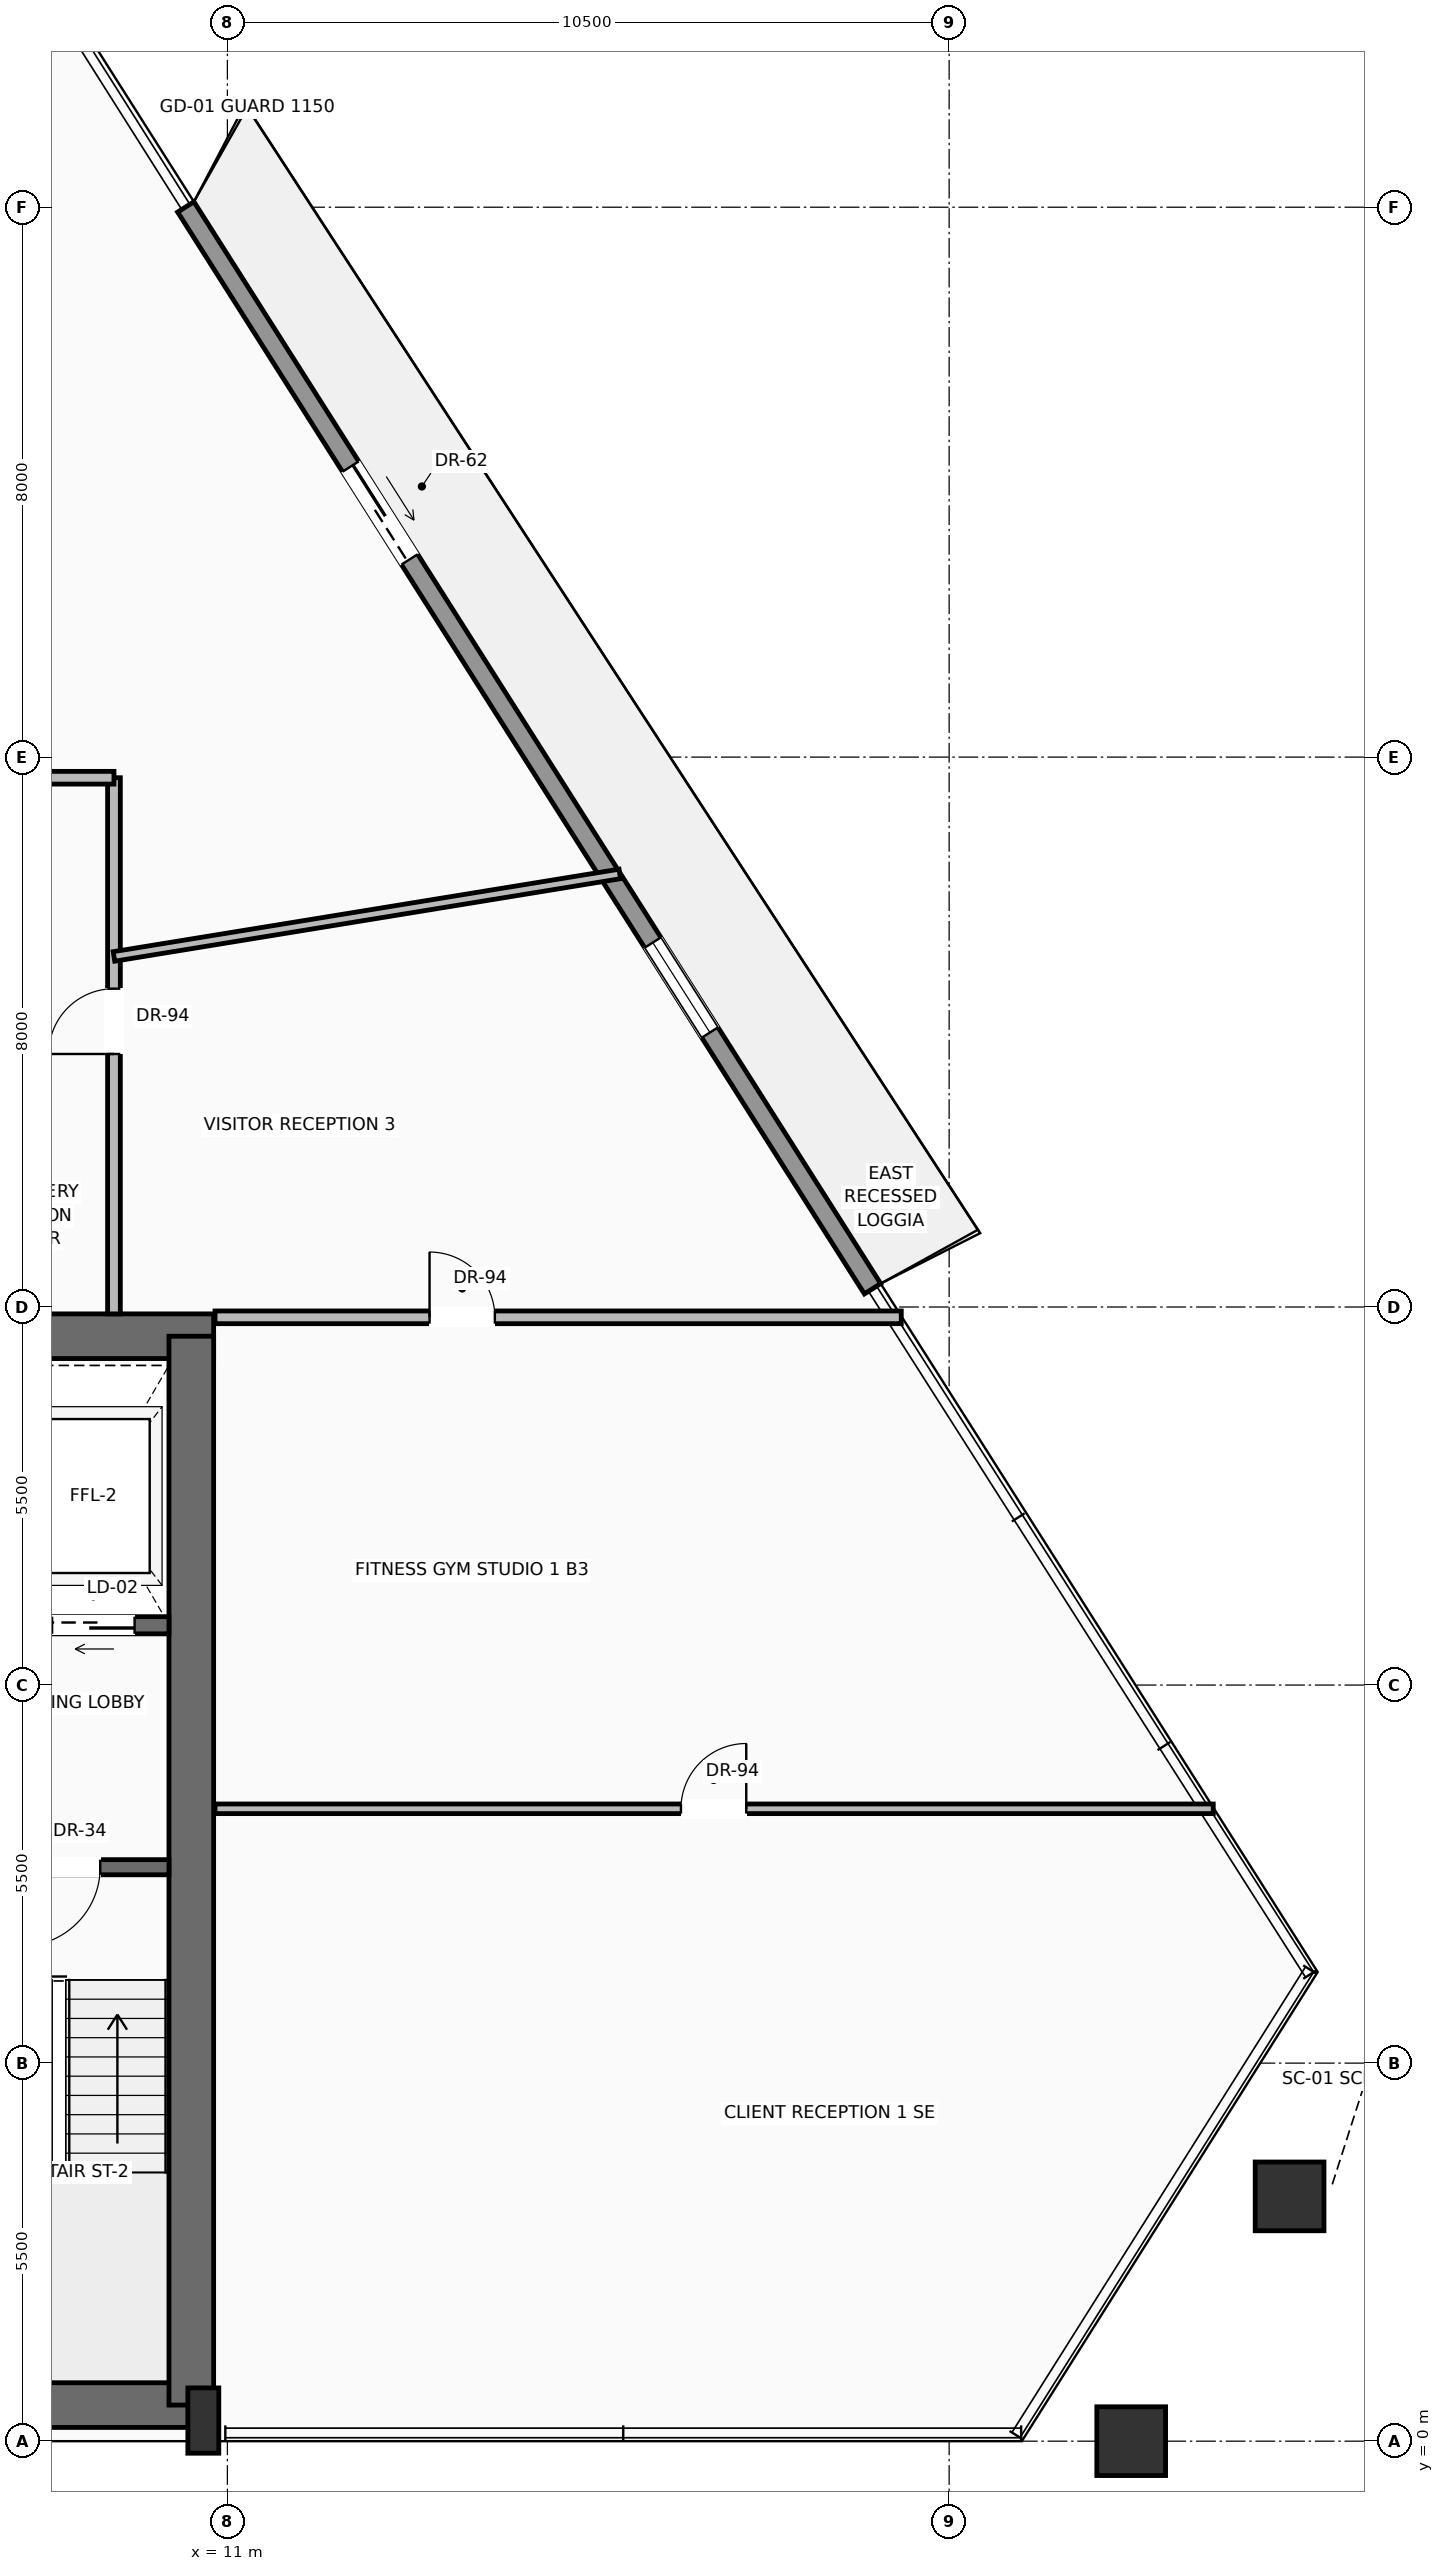
"""IFC4 building model, lengths in metres.
Left out: names, types, materials, properties, quantities, classifications, styles, units other than length and angle.
Written with IfcOpenShell. Run it as: python <this file> out.ifc"""

import sys

from ifc_helpers import new_model, si_unit, direction, frame, frame_2d, origin, origin_2d, place, context, subcontext, project, spatial, rectangle, hollow_rectangle, extrude, source, transform, mapped, element, fill, save


model = new_model("IFC4")
c1 = context("Model", 3, precision=1e-05, world=origin(), true_north=direction((0.0, 1.0)))
c2 = subcontext(c1, "Body", "Model", "MODEL_VIEW")
j1 = project(units=[si_unit("LENGTHUNIT", "METRE"), si_unit("PLANEANGLEUNIT", "RADIAN")], contexts=[c1])
p1 = place(None, origin())
s1 = spatial("IfcSite", under=j1, at=p1, CompositionType="ELEMENT")
p2 = place(p1, origin())
s2 = spatial("IfcBuilding", under=s1, at=p2, CompositionType="ELEMENT")
p3 = place(p2, frame((0.0, 0.0, 171.0)))
s3 = spatial("IfcBuildingStorey", under=s2, at=p3, CompositionType="ELEMENT", Elevation=171.0)
p4 = place(p3, frame((-10.65, 0.525, 0.0), z_axis=(0.0, 0.0, 1.0), x_axis=(1.0, 0.0, 0.0)))
e1 = element("IfcWall", 1, at=p4, inside=s3, PredefinedType="SHEAR", context=c2, shape_type="SweptSolid", body=[
    extrude(rectangle(XDim=21.3, YDim=0.65, at=frame_2d((10.65, 0.0))), origin(), (0.0, 0.0, 1.0), 3.47),
])
p5 = place(p3, frame((-10.8, 16.075, 0.0), z_axis=(0.0, 0.0, 1.0), x_axis=(1.0, 0.0, 0.0)))
e2 = element("IfcWall", 2, at=p5, inside=s3, PredefinedType="SHEAR", context=c2, shape_type="SweptSolid", body=[
    extrude(rectangle(XDim=21.6, YDim=0.65, at=frame_2d((10.8, 0.0))), origin(), (0.0, 0.0, 1.0), 3.47),
])
p6 = place(p5, frame((3.37, 0.0, 0.0)))
e3 = element("IfcOpeningElement", 3, at=p6, cuts=e2, PredefinedType="OPENING", context=c2, shape_type="SweptSolid", body=[
    extrude(rectangle(XDim=1.3, YDim=2.3, at=frame_2d((0.65, 1.15))), frame((0.0, 0.335, 0.0), z_axis=(0.0, -1.0, 0.0), x_axis=(1.0, 0.0, 0.0)), (0.0, 0.0, 1.0), 0.67),
])
p7 = place(p5, frame((9.8, 0.0, 0.0)))
e4 = element("IfcOpeningElement", 4, at=p7, cuts=e2, PredefinedType="OPENING", context=c2, shape_type="SweptSolid", body=[
    extrude(rectangle(XDim=2.0, YDim=2.4, at=frame_2d((1.0, 1.2))), frame((0.0, 0.335, 0.0), z_axis=(0.0, -1.0, 0.0), x_axis=(1.0, 0.0, 0.0)), (0.0, 0.0, 1.0), 0.67),
])
p8 = place(p3, frame((10.475, 0.525, 0.0), z_axis=(0.0, 0.0, 1.0), x_axis=(0.0, 1.0, 0.0)))
e5 = element("IfcWall", 5, at=p8, inside=s3, PredefinedType="SHEAR", context=c2, shape_type="SweptSolid", body=[
    extrude(rectangle(XDim=15.55, YDim=0.65, at=frame_2d((7.775, 0.0))), origin(), (0.0, 0.0, 1.0), 3.47),
])
m1 = source(origin(), c2, "Body", "SweptSolid", [
    extrude(rectangle(XDim=0.45, YDim=0.95, at=origin_2d()), origin(), (0.0, 0.0, 1.0), 3.7),
])
p9 = place(p3, frame((10.65, 0.3, 0.0), z_axis=(0.0, 0.0, 1.0), x_axis=(1.0, 0.0, 0.0)))
e6 = element("IfcColumn", 6, at=p9, inside=s3, PredefinedType="PILASTER", context=c2, shape_type="MappedRepresentation", body=[
    mapped(m1, transform((0.0, 0.0, 0.0), scale=1.0)),
])
m2 = source(origin(), c2, "Body", "SweptSolid", [
    extrude(hollow_rectangle(XDim=1.0, YDim=1.0, WallThickness=0.05, at=origin_2d()), origin(), (0.0, 0.0, 1.0), 3.691),
])
p10 = place(p3, frame((24.148, 0.0, 0.004), z_axis=(0.006481774014, 0.0, 0.999978993082), x_axis=(0.0, 1.0, 0.0)))
e7 = element("IfcColumn", 7, at=p10, inside=s3, PredefinedType="COLUMN", context=c2, shape_type="MappedRepresentation", body=[
    mapped(m2, transform((0.0, 0.0, 0.0), scale=1.0)),
])
m3 = source(origin(), c2, "Body", "SweptSolid", [
    extrude(hollow_rectangle(XDim=1.0, YDim=1.0, WallThickness=0.05, at=origin_2d()), origin(), (0.0, 0.0, 1.0), 3.692),
])
p11 = place(p3, frame((26.453, 3.561, 0.004), z_axis=(-0.00542296422, -0.014813951039, 0.999875561414), x_axis=(0.939056850257, -0.343761882683, 0.0)))
e8 = element("IfcColumn", 8, at=p11, inside=s3, PredefinedType="COLUMN", context=c2, shape_type="MappedRepresentation", body=[
    mapped(m3, transform((0.0, 0.0, 0.0), scale=1.0)),
])
p12 = place(p3, frame((10.395, 32.504, 0.0), z_axis=(0.0, 0.0, 1.0), x_axis=(0.535922647913, -0.844267087748, 0.0)))
e9 = element("IfcWall", 9, at=p12, inside=s3, PredefinedType="SOLIDWALL", context=c2, shape_type="SweptSolid", body=[
    extrude(rectangle(XDim=18.642, YDim=0.28, at=frame_2d((9.321, 0.0))), origin(), (0.0, 0.0, 1.0), 3.05),
])
p13 = place(p12, frame((4.474, 0.0, 0.0)))
e10 = element("IfcOpeningElement", 10, at=p13, cuts=e9, PredefinedType="OPENING", context=c2, shape_type="SweptSolid", body=[
    extrude(rectangle(XDim=1.6, YDim=2.35, at=frame_2d((0.8, 1.175))), frame((0.0, 0.15, 0.0), z_axis=(0.0, -1.0, 0.0), x_axis=(1.0, 0.0, 0.0)), (0.0, 0.0, 1.0), 0.3),
])
p14 = place(p12, frame((12.677, 0.0, 0.9)))
e11 = element("IfcOpeningElement", 11, at=p14, cuts=e9, PredefinedType="OPENING", context=c2, shape_type="SweptSolid", body=[
    extrude(rectangle(XDim=1.55, YDim=1.85, at=frame_2d((0.775, 0.925))), frame((0.0, 0.15, 0.0), z_axis=(0.0, -1.0, 0.0), x_axis=(1.0, 0.0, 0.0)), (0.0, 0.0, 1.0), 0.3),
])
p15 = place(p3, frame((10.15, 8.35, 0.0), z_axis=(0.0, 0.0, 1.0), x_axis=(-1.0, 0.0, 0.0)))
e12 = element("IfcWall", 12, at=p15, inside=s3, PredefinedType="SOLIDWALL", context=c2, shape_type="SweptSolid", body=[
    extrude(rectangle(XDim=4.65, YDim=0.22, at=frame_2d((2.325, 0.0))), origin(), (0.0, 0.0, 1.0), 3.47),
])
p16 = place(p15, frame((1.0, 0.0, 0.0)))
e13 = element("IfcOpeningElement", 13, at=p16, cuts=e12, PredefinedType="OPENING", context=c2, shape_type="SweptSolid", body=[
    extrude(rectangle(XDim=1.15, YDim=2.2, at=frame_2d((0.575, 1.1))), frame((0.0, 0.12, 0.0), z_axis=(0.0, -1.0, 0.0), x_axis=(1.0, 0.0, 0.0)), (0.0, 0.0, 1.0), 0.24),
])
p17 = place(p3, frame((10.15, 11.87, 0.0), z_axis=(0.0, 0.0, 1.0), x_axis=(-1.0, 0.0, 0.0)))
e14 = element("IfcWall", 14, at=p17, inside=s3, PredefinedType="SOLIDWALL", context=c2, shape_type="SweptSolid", body=[
    extrude(rectangle(XDim=4.65, YDim=0.25, at=frame_2d((2.325, 0.0))), origin(), (0.0, 0.0, 1.0), 3.47),
])
p18 = place(p17, frame((0.5, 0.0, 0.0)))
e15 = element("IfcOpeningElement", 15, at=p18, cuts=e14, PredefinedType="OPENING", context=c2, shape_type="SweptSolid", body=[
    extrude(rectangle(XDim=1.2, YDim=2.25, at=frame_2d((0.6, 1.125))), frame((0.0, 0.135, 0.0), z_axis=(0.0, -1.0, 0.0), x_axis=(1.0, 0.0, 0.0)), (0.0, 0.0, 1.0), 0.27),
])
p19 = place(p3, frame((9.35, 16.4, 0.0), z_axis=(0.0, 0.0, 1.0), x_axis=(0.0, 1.0, 0.0)))
e16 = element("IfcWall", 16, at=p19, inside=s3, PredefinedType="PARTITIONING", context=c2, shape_type="SweptSolid", body=[
    extrude(rectangle(XDim=7.8, YDim=0.185, at=frame_2d((3.9, 0.0))), origin(), (0.0, 0.0, 1.0), 3.462),
])
p20 = place(p19, frame((3.781, 0.0, 0.0)))
e17 = element("IfcOpeningElement", 17, at=p20, cuts=e16, PredefinedType="OPENING", context=c2, shape_type="SweptSolid", body=[
    extrude(rectangle(XDim=0.95, YDim=2.2, at=frame_2d((0.475, 1.1))), frame((0.0, 0.103, 0.0), z_axis=(0.0, -1.0, 0.0), x_axis=(1.0, 0.0, 0.0)), (0.0, 0.0, 1.0), 0.205),
])
p21 = place(p3, frame((7.15, 24.2, 0.0), z_axis=(0.0, 0.0, 1.0), x_axis=(1.0, 0.0, 0.0)))
e18 = element("IfcWall", 18, at=p21, inside=s3, PredefinedType="PARTITIONING", context=c2, shape_type="SweptSolid", body=[
    extrude(rectangle(XDim=2.2, YDim=0.185, at=frame_2d((1.1, 0.0))), origin(), (0.0, 0.0, 1.0), 3.462),
])
p22 = place(p3, frame((10.82, 16.35, 0.0), z_axis=(0.0, 0.0, 1.0), x_axis=(1.0, 0.0, 0.0)))
e19 = element("IfcWall", 19, at=p22, inside=s3, PredefinedType="PARTITIONING", context=c2, shape_type="SweptSolid", body=[
    extrude(rectangle(XDim=9.983, YDim=0.185, at=frame_2d((4.992, 0.0))), origin(), (0.0, 0.0, 1.0), 3.462),
])
p23 = place(p22, frame((3.121, 0.0, 0.0)))
e20 = element("IfcOpeningElement", 20, at=p23, cuts=e19, PredefinedType="OPENING", context=c2, shape_type="SweptSolid", body=[
    extrude(rectangle(XDim=0.95, YDim=2.2, at=frame_2d((0.475, 1.1))), frame((0.0, 0.103, 0.0), z_axis=(0.0, -1.0, 0.0), x_axis=(1.0, 0.0, 0.0)), (0.0, 0.0, 1.0), 0.205),
])
p24 = place(p3, frame((10.82, 9.2, 0.0), z_axis=(0.0, 0.0, 1.0), x_axis=(1.0, 0.0, 0.0)))
e21 = element("IfcWall", 21, at=p24, inside=s3, PredefinedType="PARTITIONING", context=c2, shape_type="SweptSolid", body=[
    extrude(rectangle(XDim=14.522, YDim=0.14, at=frame_2d((7.261, 0.0))), origin(), (0.0, 0.0, 1.0), 3.462),
])
p25 = place(p24, frame((6.778, 0.0, 0.0)))
e22 = element("IfcOpeningElement", 22, at=p25, cuts=e21, PredefinedType="OPENING", context=c2, shape_type="SweptSolid", body=[
    extrude(rectangle(XDim=0.95, YDim=2.2, at=frame_2d((0.475, 1.1))), frame((0.0, 0.08, 0.0), z_axis=(0.0, -1.0, 0.0), x_axis=(1.0, 0.0, 0.0)), (0.0, 0.0, 1.0), 0.16),
])
p26 = place(p3, frame((9.35, 21.6, 0.0), z_axis=(0.0, 0.0, 1.0), x_axis=(0.986959646551, 0.160967872817, 0.0)))
e23 = element("IfcWall", 23, at=p26, inside=s3, PredefinedType="PARTITIONING", context=c2, shape_type="SweptSolid", body=[
    extrude(rectangle(XDim=7.456, YDim=0.14, at=frame_2d((3.728, 0.0))), origin(), (0.0, 0.0, 1.0), 3.049),
])
m4 = source(origin(), c2, "Body", "SweptSolid", [
    extrude(rectangle(XDim=1.6, YDim=2.35, at=frame_2d((0.8, 1.175))), frame((0.0, 0.025, 0.0), z_axis=(0.0, -1.0, 0.0), x_axis=(1.0, 0.0, 0.0)), (0.0, 0.0, 1.0), 0.05),
])
p27 = place(p13, origin())
e24 = element("IfcDoor", 24, at=p27, inside=s3, OperationType="SLIDING_TO_RIGHT", PredefinedType="DOOR", context=c2, shape_type="MappedRepresentation", body=[
    mapped(m4, transform((0.0, 0.0, 0.0), scale=1.0)),
])
fill(e10, e24)
m5 = source(origin(), c2, "Body", "SweptSolid", [
    extrude(rectangle(XDim=1.55, YDim=1.85, at=frame_2d((0.775, 0.925))), frame((0.0, 0.03, 0.0), z_axis=(0.0, -1.0, 0.0), x_axis=(1.0, 0.0, 0.0)), (0.0, 0.0, 1.0), 0.06),
])
p28 = place(p14, origin())
e25 = element("IfcWindow", 25, at=p28, inside=s3, PartitioningType="SINGLE_PANEL", PredefinedType="WINDOW", context=c2, shape_type="MappedRepresentation", body=[
    mapped(m5, transform((0.0, 0.0, 0.0), scale=1.0)),
])
fill(e11, e25)
m6 = source(origin(), c2, "Body", "SweptSolid", [
    extrude(rectangle(XDim=1.15, YDim=2.2, at=frame_2d((0.575, 1.1))), frame((0.0, 0.025, 0.0), z_axis=(0.0, -1.0, 0.0), x_axis=(1.0, 0.0, 0.0)), (0.0, 0.0, 1.0), 0.05),
])
p29 = place(p16, origin())
e26 = element("IfcDoor", 26, at=p29, inside=s3, OperationType="SINGLE_SWING_RIGHT", PredefinedType="DOOR", context=c2, shape_type="MappedRepresentation", body=[
    mapped(m6, transform((0.0, 0.0, 0.0), scale=1.0)),
])
fill(e13, e26)
m7 = source(origin(), c2, "Body", "SweptSolid", [
    extrude(rectangle(XDim=1.2, YDim=2.25, at=frame_2d((0.6, 1.125))), frame((0.0, 0.025, 0.0), z_axis=(0.0, -1.0, 0.0), x_axis=(1.0, 0.0, 0.0)), (0.0, 0.0, 1.0), 0.05),
])
p30 = place(p18, origin())
e27 = element("IfcDoor", 27, at=p30, inside=s3, OperationType="SLIDING_TO_RIGHT", PredefinedType="DOOR", context=c2, shape_type="MappedRepresentation", body=[
    mapped(m7, transform((0.0, 0.0, 0.0), scale=1.0)),
])
fill(e15, e27)
m8 = source(origin(), c2, "Body", "SweptSolid", [
    extrude(rectangle(XDim=0.95, YDim=2.2, at=frame_2d((0.475, 1.1))), frame((0.0, 0.025, 0.0), z_axis=(0.0, -1.0, 0.0), x_axis=(1.0, 0.0, 0.0)), (0.0, 0.0, 1.0), 0.05),
])
p31 = place(p20, origin())
e28 = element("IfcDoor", 28, at=p31, inside=s3, OperationType="SINGLE_SWING_LEFT", PredefinedType="DOOR", context=c2, shape_type="MappedRepresentation", body=[
    mapped(m8, transform((0.0, 0.0, 0.0), scale=1.0)),
])
fill(e17, e28)
p32 = place(p23, origin())
e29 = element("IfcDoor", 29, at=p32, inside=s3, OperationType="SINGLE_SWING_LEFT", PredefinedType="DOOR", context=c2, shape_type="MappedRepresentation", body=[
    mapped(m8, transform((0.0, 0.0, 0.0), scale=1.0)),
])
fill(e20, e29)
p33 = place(p25, origin())
e30 = element("IfcDoor", 30, at=p33, inside=s3, OperationType="SINGLE_SWING_RIGHT", PredefinedType="DOOR", context=c2, shape_type="MappedRepresentation", body=[
    mapped(m8, transform((0.0, 0.0, 0.0), scale=1.0)),
])
fill(e22, e30)
save(model, sys.argv[1])
